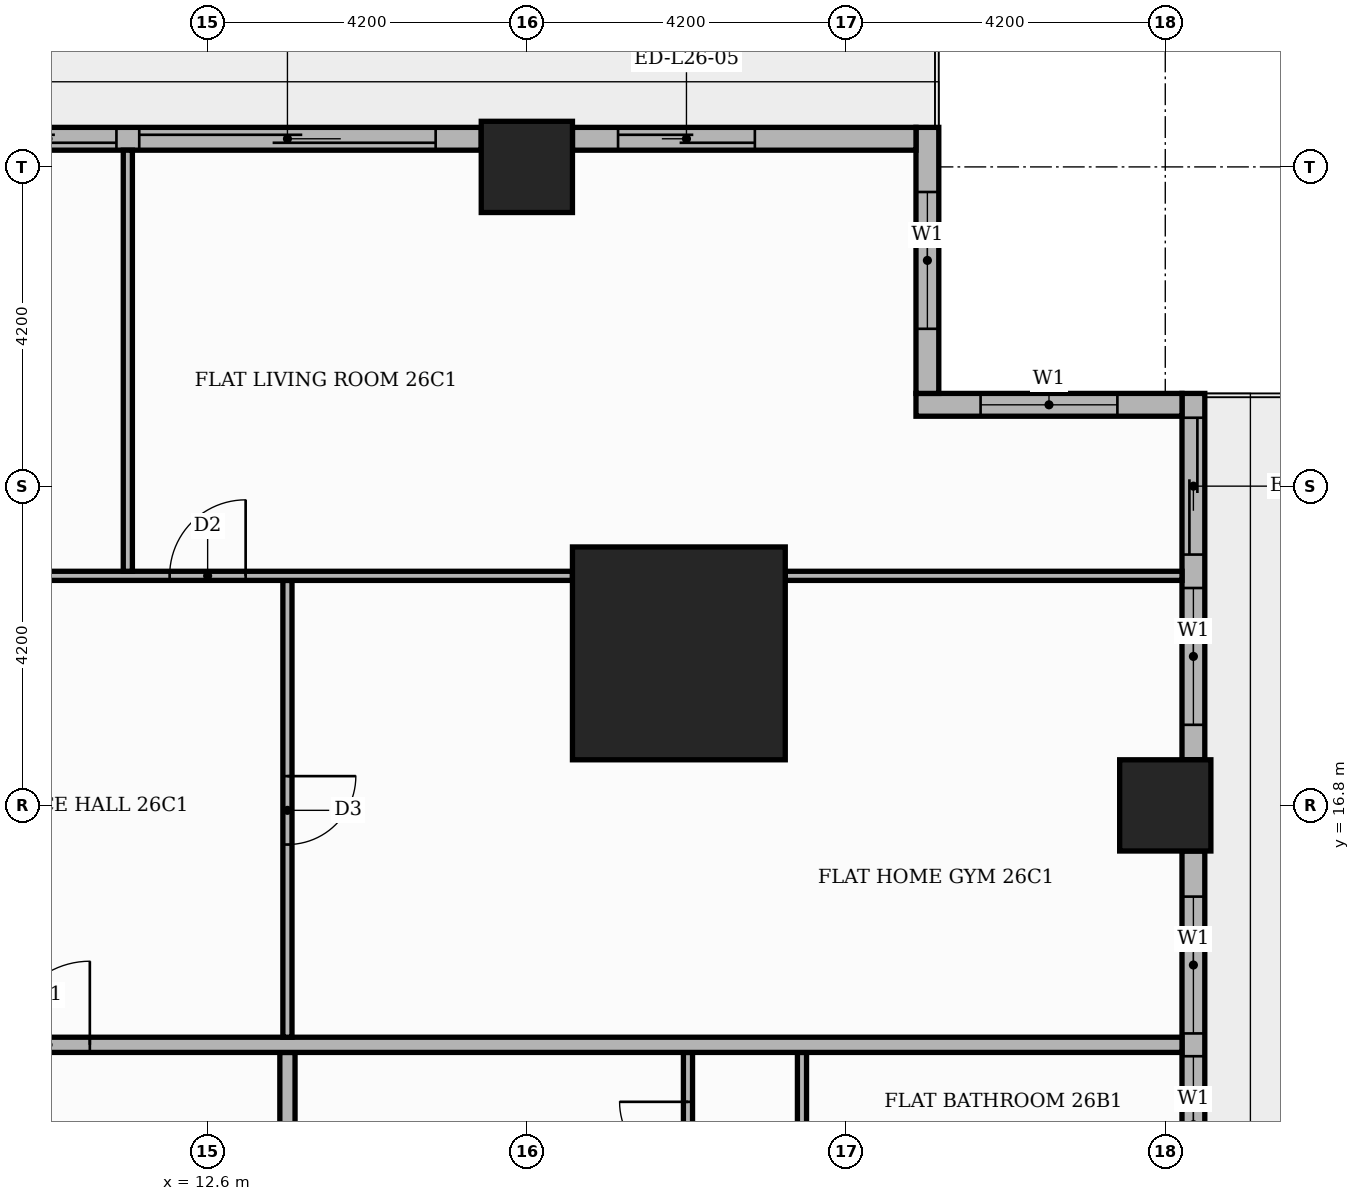
"""IFC4 building model, lengths in metres.
Left out: names, types, materials, properties, quantities, classifications, styles, units other than length and angle.
Written with IfcOpenShell. Run it as: python <this file> out.ifc"""

import sys

from ifc_helpers import new_model, si_unit, direction, frame, frame_2d, origin, origin_2d, place, context, subcontext, project, spatial, rectangle, extrude, element, fill, save


model = new_model("IFC4")
c1 = context("Model", 3, precision=1e-05, world=origin(), true_north=direction((0.0, 1.0)))
c2 = subcontext(c1, "Body", "Model", "MODEL_VIEW")
j1 = project(units=[si_unit("LENGTHUNIT", "METRE"), si_unit("PLANEANGLEUNIT", "RADIAN")], contexts=[c1])
p1 = place(None, origin())
s1 = spatial("IfcSite", under=j1, at=p1, CompositionType="ELEMENT")
p2 = place(p1, origin())
s2 = spatial("IfcBuilding", under=s1, at=p2, CompositionType="ELEMENT")
p3 = place(p2, frame((0.0, 0.0, 110.4)))
s3 = spatial("IfcBuildingStorey", under=s2, at=p3, CompositionType="ELEMENT", Elevation=110.4)
p4 = place(p3, frame((18.8, 18.8, 0.0), z_axis=(0.0, 0.0, 1.0), x_axis=(1.0, 0.0, 0.0)))
e1 = element("IfcColumn", 1, at=p4, inside=s3, PredefinedType="COLUMN", context=c2, shape_type="SweptSolid", body=[
    extrude(rectangle(XDim=2.8, YDim=2.8, at=origin_2d()), origin(), (0.0, 0.0, 1.0), 3.9),
])
for number, where, z_axis, x_axis in (
    (2, (25.2, 16.8, 0.0), (0.0, 0.0, 1.0), (1.0, 0.0, 0.0)),
    (3, (16.8, 25.2, 0.0), (0.0, 0.0, 1.0), (1.0, 0.0, 0.0)),
):
    element("IfcColumn", number, at=place(p3, frame(where, z_axis=z_axis, x_axis=x_axis)), inside=s3, PredefinedType="COLUMN", context=c2, shape_type="SweptSolid", body=[
        extrude(rectangle(XDim=1.2, YDim=1.2, at=origin_2d()), origin(), (0.0, 0.0, 1.0), 3.9),
    ])
p5 = place(p3, frame((25.57, 9.0, 0.0), z_axis=(0.0, 0.0, 1.0), x_axis=(0.0, 1.0, 0.0)))
e4 = element("IfcWall", 4, at=p5, inside=s3, PredefinedType="STANDARD", context=c2, shape_type="SweptSolid", body=[
    extrude(rectangle(XDim=7.2, YDim=0.3, at=frame_2d((3.6, 0.0))), origin(), (0.0, 0.0, 1.0), 3.48),
])
p6 = place(p5, frame((0.6, 0.0, 0.9)))
e5 = element("IfcOpeningElement", 5, at=p6, cuts=e4, PredefinedType="OPENING", context=c2, shape_type="SweptSolid", body=[
    extrude(rectangle(XDim=1.8, YDim=2.1, at=frame_2d((0.9, 1.05))), frame((0.0, 0.16, 0.0), z_axis=(0.0, -1.0, 0.0), x_axis=(1.0, 0.0, 0.0)), (0.0, 0.0, 1.0), 0.32),
])
p7 = place(p5, frame((2.7, 0.0, 0.9)))
e6 = element("IfcOpeningElement", 6, at=p7, cuts=e4, PredefinedType="OPENING", context=c2, shape_type="SweptSolid", body=[
    extrude(rectangle(XDim=1.8, YDim=2.1, at=frame_2d((0.9, 1.05))), frame((0.0, 0.16, 0.0), z_axis=(0.0, -1.0, 0.0), x_axis=(1.0, 0.0, 0.0)), (0.0, 0.0, 1.0), 0.32),
])
p8 = place(p5, frame((4.8, 0.0, 0.9)))
e7 = element("IfcOpeningElement", 7, at=p8, cuts=e4, PredefinedType="OPENING", context=c2, shape_type="SweptSolid", body=[
    extrude(rectangle(XDim=1.8, YDim=2.1, at=frame_2d((0.9, 1.05))), frame((0.0, 0.16, 0.0), z_axis=(0.0, -1.0, 0.0), x_axis=(1.0, 0.0, 0.0)), (0.0, 0.0, 1.0), 0.32),
])
p9 = place(p3, frame((25.57, 17.4, 0.0), z_axis=(0.0, 0.0, 1.0), x_axis=(0.0, 1.0, 0.0)))
e8 = element("IfcWall", 8, at=p9, inside=s3, PredefinedType="STANDARD", context=c2, shape_type="SweptSolid", body=[
    extrude(rectangle(XDim=4.82, YDim=0.3, at=frame_2d((2.41, 0.0))), origin(), (0.0, 0.0, 1.0), 3.48),
])
p10 = place(p9, frame((2.7, 0.0, 0.0)))
e9 = element("IfcOpeningElement", 9, at=p10, cuts=e8, PredefinedType="OPENING", context=c2, shape_type="SweptSolid", body=[
    extrude(rectangle(XDim=1.8, YDim=2.4, at=frame_2d((0.9, 1.2))), frame((0.0, 0.16, 0.0), z_axis=(0.0, -1.0, 0.0), x_axis=(1.0, 0.0, 0.0)), (0.0, 0.0, 1.0), 0.32),
])
p11 = place(p9, frame((0.46, 0.0, 0.9)))
e10 = element("IfcOpeningElement", 10, at=p11, cuts=e8, PredefinedType="OPENING", context=c2, shape_type="SweptSolid", body=[
    extrude(rectangle(XDim=1.8, YDim=2.1, at=frame_2d((0.9, 1.05))), frame((0.0, 0.16, 0.0), z_axis=(0.0, -1.0, 0.0), x_axis=(1.0, 0.0, 0.0)), (0.0, 0.0, 1.0), 0.32),
])
p12 = place(p3, frame((25.42, 22.07, 0.0), z_axis=(0.0, 0.0, 1.0), x_axis=(-1.0, 0.0, 0.0)))
e11 = element("IfcWall", 11, at=p12, inside=s3, PredefinedType="STANDARD", context=c2, shape_type="SweptSolid", body=[
    extrude(rectangle(XDim=3.5, YDim=0.3, at=frame_2d((1.75, 0.0))), origin(), (0.0, 0.0, 1.0), 3.48),
])
p13 = place(p12, frame((0.85, 0.0, 0.9)))
e12 = element("IfcOpeningElement", 12, at=p13, cuts=e11, PredefinedType="OPENING", context=c2, shape_type="SweptSolid", body=[
    extrude(rectangle(XDim=1.8, YDim=2.1, at=frame_2d((0.9, 1.05))), frame((0.0, 0.16, 0.0), z_axis=(0.0, -1.0, 0.0), x_axis=(1.0, 0.0, 0.0)), (0.0, 0.0, 1.0), 0.32),
])
p14 = place(p3, frame((22.07, 22.22, 0.0), z_axis=(0.0, 0.0, 1.0), x_axis=(0.0, 1.0, 0.0)))
e13 = element("IfcWall", 13, at=p14, inside=s3, PredefinedType="STANDARD", context=c2, shape_type="SweptSolid", body=[
    extrude(rectangle(XDim=3.5, YDim=0.3, at=frame_2d((1.75, 0.0))), origin(), (0.0, 0.0, 1.0), 3.48),
])
p15 = place(p14, frame((0.85, 0.0, 0.9)))
e14 = element("IfcOpeningElement", 14, at=p15, cuts=e13, PredefinedType="OPENING", context=c2, shape_type="SweptSolid", body=[
    extrude(rectangle(XDim=1.8, YDim=2.1, at=frame_2d((0.9, 1.05))), frame((0.0, 0.16, 0.0), z_axis=(0.0, -1.0, 0.0), x_axis=(1.0, 0.0, 0.0)), (0.0, 0.0, 1.0), 0.32),
])
p16 = place(p3, frame((21.92, 25.57, 0.0), z_axis=(0.0, 0.0, 1.0), x_axis=(-1.0, 0.0, 0.0)))
e15 = element("IfcWall", 15, at=p16, inside=s3, PredefinedType="STANDARD", context=c2, shape_type="SweptSolid", body=[
    extrude(rectangle(XDim=4.52, YDim=0.3, at=frame_2d((2.26, 0.0))), origin(), (0.0, 0.0, 1.0), 3.48),
])
p17 = place(p16, frame((2.12, 0.0, 0.0)))
e16 = element("IfcOpeningElement", 16, at=p17, cuts=e15, PredefinedType="OPENING", context=c2, shape_type="SweptSolid", body=[
    extrude(rectangle(XDim=1.8, YDim=2.4, at=frame_2d((0.9, 1.2))), frame((0.0, 0.16, 0.0), z_axis=(0.0, -1.0, 0.0), x_axis=(1.0, 0.0, 0.0)), (0.0, 0.0, 1.0), 0.32),
])
p18 = place(p3, frame((16.2, 25.57, 0.0), z_axis=(0.0, 0.0, 1.0), x_axis=(-1.0, 0.0, 0.0)))
e17 = element("IfcWall", 17, at=p18, inside=s3, PredefinedType="STANDARD", context=c2, shape_type="SweptSolid", body=[
    extrude(rectangle(XDim=7.2, YDim=0.3, at=frame_2d((3.6, 0.0))), origin(), (0.0, 0.0, 1.0), 3.48),
])
p19 = place(p18, frame((0.6, 0.0, 0.0)))
e18 = element("IfcOpeningElement", 18, at=p19, cuts=e17, PredefinedType="OPENING", context=c2, shape_type="SweptSolid", body=[
    extrude(rectangle(XDim=3.9, YDim=2.4, at=frame_2d((1.95, 1.2))), frame((0.0, 0.16, 0.0), z_axis=(0.0, -1.0, 0.0), x_axis=(1.0, 0.0, 0.0)), (0.0, 0.0, 1.0), 0.32),
])
p20 = place(p18, frame((4.8, 0.0, 0.0)))
e19 = element("IfcOpeningElement", 19, at=p20, cuts=e17, PredefinedType="OPENING", context=c2, shape_type="SweptSolid", body=[
    extrude(rectangle(XDim=1.8, YDim=2.4, at=frame_2d((0.9, 1.2))), frame((0.0, 0.16, 0.0), z_axis=(0.0, -1.0, 0.0), x_axis=(1.0, 0.0, 0.0)), (0.0, 0.0, 1.0), 0.32),
])
p21 = place(p3, frame((13.65, -13.55, 0.0), z_axis=(0.0, 0.0, 1.0), x_axis=(0.0, 1.0, 0.0)))
e20 = element("IfcWall", 20, at=p21, inside=s3, PredefinedType="PARTITIONING", context=c2, shape_type="SweptSolid", body=[
    extrude(rectangle(XDim=27.1, YDim=0.2, at=frame_2d((13.55, 0.0))), origin(), (0.0, 0.0, 1.0), 3.48),
])
p22 = place(p21, frame((2.5, 0.0, 0.0)))
e21 = element("IfcOpeningElement", 21, at=p22, cuts=e20, PredefinedType="OPENING", context=c2, shape_type="SweptSolid", body=[
    extrude(rectangle(XDim=1.1, YDim=2.4, at=frame_2d((0.55, 1.2))), frame((0.0, 0.11, 0.0), z_axis=(0.0, -1.0, 0.0), x_axis=(1.0, 0.0, 0.0)), (0.0, 0.0, 1.0), 0.22),
])
p23 = place(p3, frame((18.92, 11.31, 0.0), z_axis=(0.0, 0.0, 1.0), x_axis=(0.0, 1.0, 0.0)))
e22 = element("IfcWall", 22, at=p23, inside=s3, PredefinedType="PARTITIONING", context=c2, shape_type="SweptSolid", body=[
    extrude(rectangle(XDim=2.24, YDim=0.12, at=frame_2d((1.12, 0.0))), origin(), (0.0, 0.0, 1.0), 3.48),
])
p24 = place(p23, frame((0.69, 0.0, 0.0)))
e23 = element("IfcOpeningElement", 23, at=p24, cuts=e22, PredefinedType="OPENING", context=c2, shape_type="SweptSolid", body=[
    extrude(rectangle(XDim=0.9, YDim=2.1, at=frame_2d((0.45, 1.05))), frame((0.0, 0.07, 0.0), z_axis=(0.0, -1.0, 0.0), x_axis=(1.0, 0.0, 0.0)), (0.0, 0.0, 1.0), 0.14),
])
p25 = place(p3, frame((20.42, 11.61, 0.0), z_axis=(0.0, 0.0, 1.0), x_axis=(0.0, 1.0, 0.0)))
e24 = element("IfcWall", 24, at=p25, inside=s3, PredefinedType="PARTITIONING", context=c2, shape_type="SweptSolid", body=[
    extrude(rectangle(XDim=1.94, YDim=0.12, at=frame_2d((0.97, 0.0))), origin(), (0.0, 0.0, 1.0), 3.48),
])
p26 = place(p3, frame((-13.65, 13.65, 0.0), z_axis=(0.0, 0.0, 1.0), x_axis=(1.0, 0.0, 0.0)))
e25 = element("IfcWall", 25, at=p26, inside=s3, PredefinedType="PARTITIONING", context=c2, shape_type="SweptSolid", body=[
    extrude(rectangle(XDim=39.07, YDim=0.2, at=frame_2d((19.535, 0.0))), origin(), (0.0, 0.0, 1.0), 3.48),
])
p27 = place(p26, frame((23.6, 0.0, 0.0)))
e26 = element("IfcOpeningElement", 26, at=p27, cuts=e25, PredefinedType="OPENING", context=c2, shape_type="SweptSolid", body=[
    extrude(rectangle(XDim=1.1, YDim=2.4, at=frame_2d((0.55, 1.2))), frame((0.0, 0.11, 0.0), z_axis=(0.0, -1.0, 0.0), x_axis=(1.0, 0.0, 0.0)), (0.0, 0.0, 1.0), 0.22),
])
p28 = place(p3, frame((13.65, 13.75, 0.0), z_axis=(0.0, 0.0, 1.0), x_axis=(0.0, 1.0, 0.0)))
e27 = element("IfcWall", 27, at=p28, inside=s3, PredefinedType="PARTITIONING", context=c2, shape_type="SweptSolid", body=[
    extrude(rectangle(XDim=6.01, YDim=0.12, at=frame_2d((3.005, 0.0))), origin(), (0.0, 0.0, 1.0), 3.48),
])
p29 = place(p28, frame((2.535, 0.0, 0.0)))
e28 = element("IfcOpeningElement", 28, at=p29, cuts=e27, PredefinedType="OPENING", context=c2, shape_type="SweptSolid", body=[
    extrude(rectangle(XDim=0.9, YDim=2.1, at=frame_2d((0.45, 1.05))), frame((0.0, 0.07, 0.0), z_axis=(0.0, -1.0, 0.0), x_axis=(1.0, 0.0, 0.0)), (0.0, 0.0, 1.0), 0.14),
])
p30 = place(p3, frame((-13.55, 19.82, 0.0), z_axis=(0.0, 0.0, 1.0), x_axis=(1.0, 0.0, 0.0)))
e29 = element("IfcWall", 29, at=p30, inside=s3, PredefinedType="PARTITIONING", context=c2, shape_type="SweptSolid", body=[
    extrude(rectangle(XDim=30.95, YDim=0.12, at=frame_2d((15.475, 0.0))), origin(), (0.0, 0.0, 1.0), 3.48),
])
p31 = place(p30, frame((25.65, 0.0, 0.0)))
e30 = element("IfcOpeningElement", 30, at=p31, cuts=e29, PredefinedType="OPENING", context=c2, shape_type="SweptSolid", body=[
    extrude(rectangle(XDim=1.0, YDim=2.1, at=frame_2d((0.5, 1.05))), frame((0.0, 0.07, 0.0), z_axis=(0.0, -1.0, 0.0), x_axis=(1.0, 0.0, 0.0)), (0.0, 0.0, 1.0), 0.14),
])
p32 = place(p30, frame((20.4, 0.0, 0.0)))
e31 = element("IfcOpeningElement", 31, at=p32, cuts=e29, PredefinedType="OPENING", context=c2, shape_type="SweptSolid", body=[
    extrude(rectangle(XDim=1.0, YDim=2.1, at=frame_2d((0.5, 1.05))), frame((0.0, 0.07, 0.0), z_axis=(0.0, -1.0, 0.0), x_axis=(1.0, 0.0, 0.0)), (0.0, 0.0, 1.0), 0.14),
])
p33 = place(p30, frame((13.1, 0.0, 0.0)))
e32 = element("IfcOpeningElement", 32, at=p33, cuts=e29, PredefinedType="OPENING", context=c2, shape_type="SweptSolid", body=[
    extrude(rectangle(XDim=0.9, YDim=2.1, at=frame_2d((0.45, 1.05))), frame((0.0, 0.07, 0.0), z_axis=(0.0, -1.0, 0.0), x_axis=(1.0, 0.0, 0.0)), (0.0, 0.0, 1.0), 0.14),
])
p34 = place(p30, frame((3.65, 0.0, 0.0)))
e33 = element("IfcOpeningElement", 33, at=p34, cuts=e29, PredefinedType="OPENING", context=c2, shape_type="SweptSolid", body=[
    extrude(rectangle(XDim=0.9, YDim=2.1, at=frame_2d((0.45, 1.05))), frame((0.0, 0.07, 0.0), z_axis=(0.0, -1.0, 0.0), x_axis=(1.0, 0.0, 0.0)), (0.0, 0.0, 1.0), 0.14),
])
p35 = place(p3, frame((20.2, 19.82, 0.0), z_axis=(0.0, 0.0, 1.0), x_axis=(1.0, 0.0, 0.0)))
e34 = element("IfcWall", 34, at=p35, inside=s3, PredefinedType="PARTITIONING", context=c2, shape_type="SweptSolid", body=[
    extrude(rectangle(XDim=5.22, YDim=0.12, at=frame_2d((2.61, 0.0))), origin(), (0.0, 0.0, 1.0), 3.48),
])
p36 = place(p3, frame((11.55, 19.88, 0.0), z_axis=(0.0, 0.0, 1.0), x_axis=(0.0, 1.0, 0.0)))
e35 = element("IfcWall", 35, at=p36, inside=s3, PredefinedType="PARTITIONING", context=c2, shape_type="SweptSolid", body=[
    extrude(rectangle(XDim=5.54, YDim=0.12, at=frame_2d((2.77, 0.0))), origin(), (0.0, 0.0, 1.0), 3.48),
])
p37 = place(p7, origin())
e36 = element("IfcWindow", 36, at=p37, inside=s3, PartitioningType="SINGLE_PANEL", PredefinedType="WINDOW", context=c2, shape_type="SweptSolid", body=[
    extrude(rectangle(XDim=1.8, YDim=2.1, at=frame_2d((0.9, 1.05))), frame((0.0, 0.03, 0.0), z_axis=(0.0, -1.0, 0.0), x_axis=(1.0, 0.0, 0.0)), (0.0, 0.0, 1.0), 0.06),
])
fill(e6, e36)
p38 = place(p8, origin())
e37 = element("IfcWindow", 37, at=p38, inside=s3, PartitioningType="SINGLE_PANEL", PredefinedType="WINDOW", context=c2, shape_type="SweptSolid", body=[
    extrude(rectangle(XDim=1.8, YDim=2.1, at=frame_2d((0.9, 1.05))), frame((0.0, 0.03, 0.0), z_axis=(0.0, -1.0, 0.0), x_axis=(1.0, 0.0, 0.0)), (0.0, 0.0, 1.0), 0.06),
])
fill(e7, e37)
p39 = place(p10, origin())
e38 = element("IfcDoor", 38, at=p39, inside=s3, OperationType="SLIDING_TO_LEFT", PredefinedType="DOOR", context=c2, shape_type="SweptSolid", body=[
    extrude(rectangle(XDim=1.8, YDim=2.4, at=frame_2d((0.9, 1.2))), frame((0.0, 0.025, 0.0), z_axis=(0.0, -1.0, 0.0), x_axis=(1.0, 0.0, 0.0)), (0.0, 0.0, 1.0), 0.05),
])
fill(e9, e38)
p40 = place(p11, origin())
e39 = element("IfcWindow", 39, at=p40, inside=s3, PartitioningType="SINGLE_PANEL", PredefinedType="WINDOW", context=c2, shape_type="SweptSolid", body=[
    extrude(rectangle(XDim=1.8, YDim=2.1, at=frame_2d((0.9, 1.05))), frame((0.0, 0.03, 0.0), z_axis=(0.0, -1.0, 0.0), x_axis=(1.0, 0.0, 0.0)), (0.0, 0.0, 1.0), 0.06),
])
fill(e10, e39)
p41 = place(p13, origin())
e40 = element("IfcWindow", 40, at=p41, inside=s3, PartitioningType="SINGLE_PANEL", PredefinedType="WINDOW", context=c2, shape_type="SweptSolid", body=[
    extrude(rectangle(XDim=1.8, YDim=2.1, at=frame_2d((0.9, 1.05))), frame((0.0, 0.03, 0.0), z_axis=(0.0, -1.0, 0.0), x_axis=(1.0, 0.0, 0.0)), (0.0, 0.0, 1.0), 0.06),
])
fill(e12, e40)
p42 = place(p15, origin())
e41 = element("IfcWindow", 41, at=p42, inside=s3, PartitioningType="SINGLE_PANEL", PredefinedType="WINDOW", context=c2, shape_type="SweptSolid", body=[
    extrude(rectangle(XDim=1.8, YDim=2.1, at=frame_2d((0.9, 1.05))), frame((0.0, 0.03, 0.0), z_axis=(0.0, -1.0, 0.0), x_axis=(1.0, 0.0, 0.0)), (0.0, 0.0, 1.0), 0.06),
])
fill(e14, e41)
p43 = place(p17, origin())
e42 = element("IfcDoor", 42, at=p43, inside=s3, OperationType="SLIDING_TO_RIGHT", PredefinedType="DOOR", context=c2, shape_type="SweptSolid", body=[
    extrude(rectangle(XDim=1.8, YDim=2.4, at=frame_2d((0.9, 1.2))), frame((0.0, 0.025, 0.0), z_axis=(0.0, -1.0, 0.0), x_axis=(1.0, 0.0, 0.0)), (0.0, 0.0, 1.0), 0.05),
])
fill(e16, e42)
p44 = place(p19, origin())
e43 = element("IfcDoor", 43, at=p44, inside=s3, OperationType="SLIDING_TO_LEFT", PredefinedType="DOOR", context=c2, shape_type="SweptSolid", body=[
    extrude(rectangle(XDim=3.9, YDim=2.4, at=frame_2d((1.95, 1.2))), frame((0.0, 0.025, 0.0), z_axis=(0.0, -1.0, 0.0), x_axis=(1.0, 0.0, 0.0)), (0.0, 0.0, 1.0), 0.05),
])
fill(e18, e43)
p45 = place(p20, origin())
e44 = element("IfcDoor", 44, at=p45, inside=s3, OperationType="SLIDING_TO_RIGHT", PredefinedType="DOOR", context=c2, shape_type="SweptSolid", body=[
    extrude(rectangle(XDim=1.8, YDim=2.4, at=frame_2d((0.9, 1.2))), frame((0.0, 0.025, 0.0), z_axis=(0.0, -1.0, 0.0), x_axis=(1.0, 0.0, 0.0)), (0.0, 0.0, 1.0), 0.05),
])
fill(e19, e44)
p46 = place(p24, origin())
e45 = element("IfcDoor", 45, at=p46, inside=s3, OperationType="SINGLE_SWING_RIGHT", PredefinedType="DOOR", context=c2, shape_type="SweptSolid", body=[
    extrude(rectangle(XDim=0.9, YDim=2.1, at=frame_2d((0.45, 1.05))), frame((0.0, 0.025, 0.0), z_axis=(0.0, -1.0, 0.0), x_axis=(1.0, 0.0, 0.0)), (0.0, 0.0, 1.0), 0.05),
])
fill(e23, e45)
p47 = place(p27, origin())
e46 = element("IfcDoor", 46, at=p47, inside=s3, OperationType="SINGLE_SWING_RIGHT", PredefinedType="DOOR", context=c2, shape_type="SweptSolid", body=[
    extrude(rectangle(XDim=1.1, YDim=2.4, at=frame_2d((0.55, 1.2))), frame((0.0, 0.025, 0.0), z_axis=(0.0, -1.0, 0.0), x_axis=(1.0, 0.0, 0.0)), (0.0, 0.0, 1.0), 0.05),
])
fill(e26, e46)
p48 = place(p29, frame((0.9, 0.0, 0.0), z_axis=(0.0, 0.0, 1.0), x_axis=(-1.0, 0.0, 0.0)))
e47 = element("IfcDoor", 47, at=p48, inside=s3, OperationType="SINGLE_SWING_RIGHT", PredefinedType="DOOR", context=c2, shape_type="SweptSolid", body=[
    extrude(rectangle(XDim=0.9, YDim=2.1, at=frame_2d((0.45, 1.05))), frame((0.0, 0.025, 0.0), z_axis=(0.0, -1.0, 0.0), x_axis=(1.0, 0.0, 0.0)), (0.0, 0.0, 1.0), 0.05),
])
fill(e28, e47)
p49 = place(p31, origin())
e48 = element("IfcDoor", 48, at=p49, inside=s3, OperationType="SINGLE_SWING_RIGHT", PredefinedType="DOOR", context=c2, shape_type="SweptSolid", body=[
    extrude(rectangle(XDim=1.0, YDim=2.1, at=frame_2d((0.5, 1.05))), frame((0.0, 0.025, 0.0), z_axis=(0.0, -1.0, 0.0), x_axis=(1.0, 0.0, 0.0)), (0.0, 0.0, 1.0), 0.05),
])
fill(e30, e48)
save(model, sys.argv[1])
